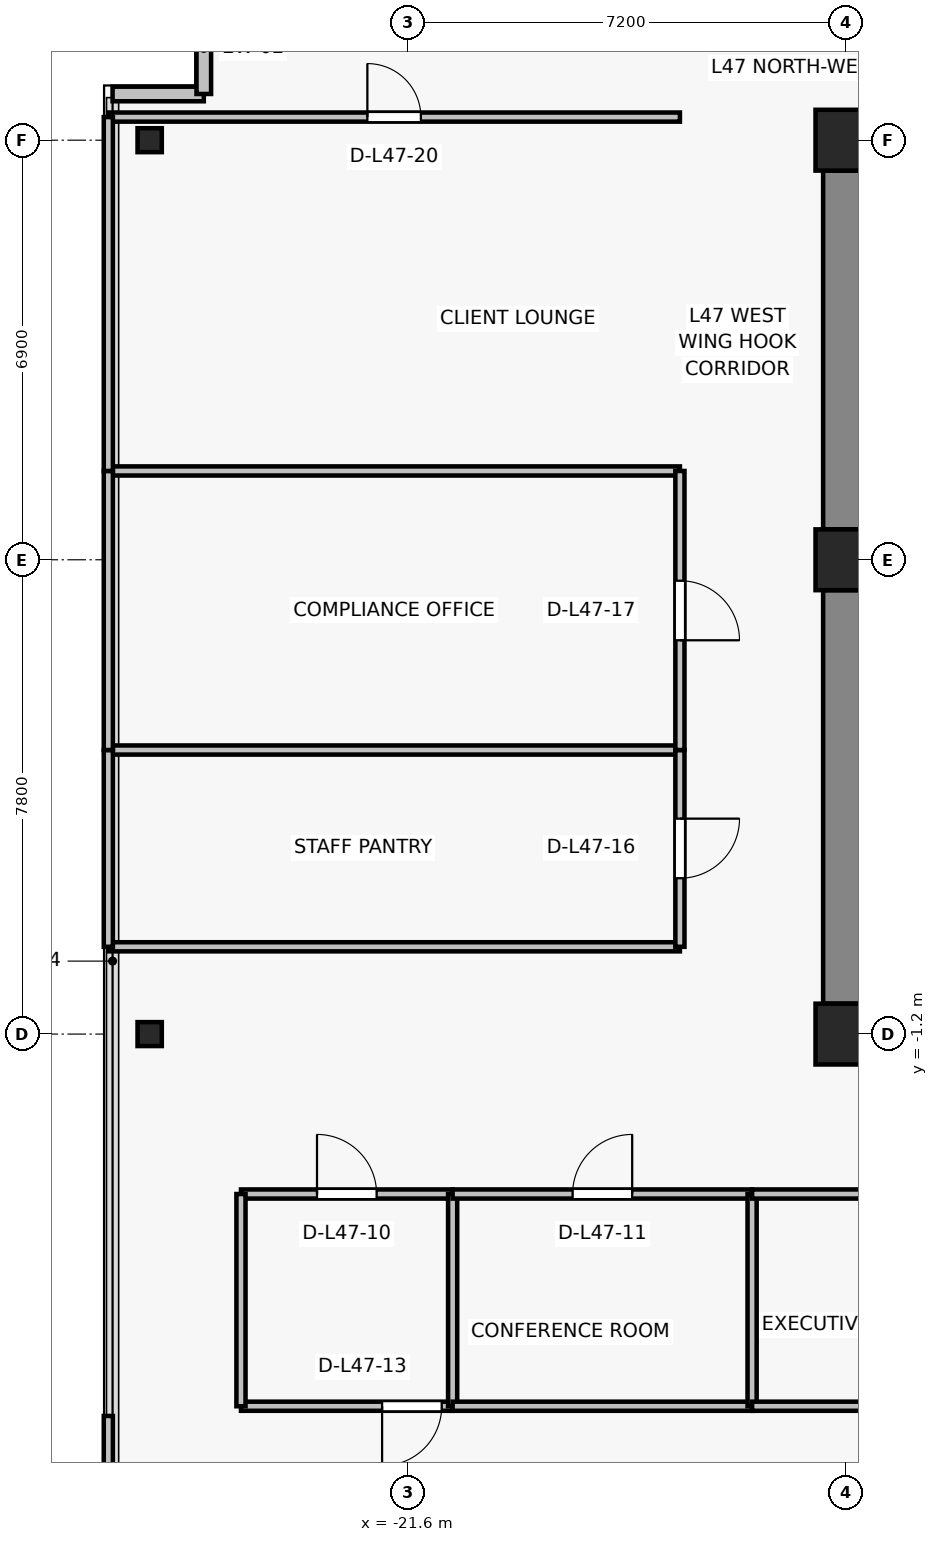
"""IFC4 building model, lengths in metres.
Left out: names, types, materials, properties, quantities, classifications, styles, units other than length and angle.
Written with IfcOpenShell. Run it as: python <this file> out.ifc"""

import sys

from ifc_helpers import new_model, si_unit, direction, frame, frame_2d, origin, origin_2d, place, context, subcontext, project, spatial, rectangle, i_section, extrude, source, transform, mapped, element, fill, save


model = new_model("IFC4")
c1 = context("Model", 3, precision=1e-05, world=origin(), true_north=direction((0.0, 1.0)))
c2 = subcontext(c1, "Body", "Model", "MODEL_VIEW")
j1 = project(units=[si_unit("LENGTHUNIT", "METRE"), si_unit("PLANEANGLEUNIT", "RADIAN")], contexts=[c1])
p1 = place(None, origin())
s1 = spatial("IfcSite", under=j1, at=p1, CompositionType="ELEMENT")
p2 = place(p1, origin())
s2 = spatial("IfcBuilding", under=s1, at=p2, CompositionType="ELEMENT")
p3 = place(p2, frame((0.0, 0.0, 169.3)))
s3 = spatial("IfcBuildingStorey", under=s2, at=p3, CompositionType="ELEMENT", Elevation=169.3)
for number, where, z_axis, x_axis in (
    (1, (-14.4, -1.2, 0.0), (0.0, 0.0, 1.0), (1.0, 0.0, 0.0)),
    (2, (-14.4, 6.6, 0.0), (0.0, 0.0, 1.0), (1.0, 0.0, 0.0)),
    (3, (-14.4, 13.5, 0.0), (0.0, 0.0, 1.0), (1.0, 0.0, 0.0)),
):
    element("IfcColumn", number, at=place(p3, frame(where, z_axis=z_axis, x_axis=x_axis)), inside=s3, PredefinedType="COLUMN", context=c2, shape_type="SweptSolid", body=[
        extrude(rectangle(XDim=1.0, YDim=1.0, at=origin_2d()), origin(), (0.0, 0.0, 1.0), 3.3),
    ])
for number, where, z_axis, x_axis in (
    (4, (-25.85, -1.2, 0.0), (0.0, 0.0, 1.0), (1.0, 0.0, 0.0)),
    (5, (-25.85, 13.5, 0.0), (0.0, 0.0, 1.0), (1.0, 0.0, 0.0)),
):
    element("IfcColumn", number, at=place(p3, frame(where, z_axis=z_axis, x_axis=x_axis)), inside=s3, PredefinedType="COLUMN", context=c2, shape_type="SweptSolid", body=[
        extrude(i_section(OverallWidth=0.399, OverallDepth=0.394, WebThickness=0.023, FlangeThickness=0.037, FilletRadius=0.015, at=origin_2d()), origin(), (0.0, 0.0, 1.0), 3.3),
    ])
p4 = place(p3, frame((-14.4, -0.7, 0.0), z_axis=(0.0, 0.0, 1.0), x_axis=(0.0, 1.0, 0.0)))
e6 = element("IfcWall", 6, at=p4, inside=s3, PredefinedType="SHEAR", context=c2, shape_type="SweptSolid", body=[
    extrude(rectangle(XDim=6.8, YDim=0.75, at=frame_2d((3.4, 0.0))), origin(), (0.0, 0.0, 1.0), 3.075),
])
p5 = place(p3, frame((-14.4, 7.1, 0.0), z_axis=(0.0, 0.0, 1.0), x_axis=(0.0, 1.0, 0.0)))
e7 = element("IfcWall", 7, at=p5, inside=s3, PredefinedType="SHEAR", context=c2, shape_type="SweptSolid", body=[
    extrude(rectangle(XDim=5.9, YDim=0.75, at=frame_2d((2.95, 0.0))), origin(), (0.0, 0.0, 1.0), 3.075),
])
for number, where, z_axis, x_axis in (
    (8, (-24.96, 14.26, 0.0), (0.0, 0.0, 1.0), (-1.0, 0.0, 0.0)),
    (9, (-24.96, 15.76, 0.0), (0.0, 0.0, 1.0), (0.0, -1.0, 0.0)),
):
    element("IfcWall", number, at=place(p3, frame(where, z_axis=z_axis, x_axis=x_axis)), inside=s3, PredefinedType="SOLIDWALL", context=c2, shape_type="SweptSolid", body=[
        extrude(rectangle(XDim=1.5, YDim=0.24, at=frame_2d((0.75, 0.0))), origin(), (0.0, 0.0, 1.0), 3.075),
    ])
p6 = place(p3, frame((-20.868, -7.32, 0.0), z_axis=(0.0, 0.0, 1.0), x_axis=(-1.0, 0.0, 0.0)))
e10 = element("IfcWall", 10, at=p6, inside=s3, PredefinedType="PARTITIONING", context=c2, shape_type="SweptSolid", body=[
    extrude(rectangle(XDim=3.481, YDim=0.15, at=frame_2d((1.74, 0.0))), origin(), (0.0, 0.0, 1.0), 2.565),
])
p7 = place(p6, frame((0.18, 0.0, 0.0)))
e11 = element("IfcOpeningElement", 11, at=p7, cuts=e10, PredefinedType="OPENING", context=c2, shape_type="SweptSolid", body=[
    extrude(rectangle(XDim=0.98, YDim=2.15, at=frame_2d((0.49, 1.075))), frame((0.0, 0.085, 0.0), z_axis=(0.0, -1.0, 0.0), x_axis=(1.0, 0.0, 0.0)), (0.0, 0.0, 1.0), 0.17),
])
p8 = place(p3, frame((-24.349, -3.83, 0.0), z_axis=(0.0, 0.0, 1.0), x_axis=(1.0, 0.0, 0.0)))
e12 = element("IfcWall", 12, at=p8, inside=s3, PredefinedType="PARTITIONING", context=c2, shape_type="SweptSolid", body=[
    extrude(rectangle(XDim=3.481, YDim=0.15, at=frame_2d((1.74, 0.0))), origin(), (0.0, 0.0, 1.0), 2.565),
])
p9 = place(p8, frame((1.25, 0.0, 0.0)))
e13 = element("IfcOpeningElement", 13, at=p9, cuts=e12, PredefinedType="OPENING", context=c2, shape_type="SweptSolid", body=[
    extrude(rectangle(XDim=0.98, YDim=2.15, at=frame_2d((0.49, 1.075))), frame((0.0, 0.085, 0.0), z_axis=(0.0, -1.0, 0.0), x_axis=(1.0, 0.0, 0.0)), (0.0, 0.0, 1.0), 0.17),
])
p10 = place(p3, frame((-24.349, -7.32, 0.0), z_axis=(0.0, 0.0, 1.0), x_axis=(0.0, 1.0, 0.0)))
e14 = element("IfcWall", 14, at=p10, inside=s3, PredefinedType="PARTITIONING", context=c2, shape_type="SweptSolid", body=[
    extrude(rectangle(XDim=3.49, YDim=0.15, at=frame_2d((1.745, 0.0))), origin(), (0.0, 0.0, 1.0), 3.075),
])
p11 = place(p3, frame((-20.868, -3.83, 0.0), z_axis=(0.0, 0.0, 1.0), x_axis=(0.0, -1.0, 0.0)))
e15 = element("IfcWall", 15, at=p11, inside=s3, PredefinedType="PARTITIONING", context=c2, shape_type="SweptSolid", body=[
    extrude(rectangle(XDim=3.49, YDim=0.15, at=frame_2d((1.745, 0.0))), origin(), (0.0, 0.0, 1.0), 2.665),
])
p12 = place(p3, frame((-15.943, -7.32, 0.0), z_axis=(0.0, 0.0, 1.0), x_axis=(-1.0, 0.0, 0.0)))
e16 = element("IfcWall", 16, at=p12, inside=s3, PredefinedType="PARTITIONING", context=c2, shape_type="SweptSolid", body=[
    extrude(rectangle(XDim=4.925, YDim=0.15, at=frame_2d((2.462, 0.0))), origin(), (0.0, 0.0, 1.0), 3.075),
])
p13 = place(p3, frame((-20.868, -3.83, 0.0), z_axis=(0.0, 0.0, 1.0), x_axis=(1.0, 0.0, 0.0)))
e17 = element("IfcWall", 17, at=p13, inside=s3, PredefinedType="PARTITIONING", context=c2, shape_type="SweptSolid", body=[
    extrude(rectangle(XDim=4.925, YDim=0.15, at=frame_2d((2.462, 0.0))), origin(), (0.0, 0.0, 1.0), 3.075),
])
p14 = place(p13, frame((1.973, 0.0, 0.0)))
e18 = element("IfcOpeningElement", 18, at=p14, cuts=e17, PredefinedType="OPENING", context=c2, shape_type="SweptSolid", body=[
    extrude(rectangle(XDim=0.98, YDim=2.15, at=frame_2d((0.49, 1.075))), frame((0.0, 0.085, 0.0), z_axis=(0.0, -1.0, 0.0), x_axis=(1.0, 0.0, 0.0)), (0.0, 0.0, 1.0), 0.17),
])
p15 = place(p3, frame((-15.943, -3.83, 0.0), z_axis=(0.0, 0.0, 1.0), x_axis=(0.0, -1.0, 0.0)))
e19 = element("IfcWall", 19, at=p15, inside=s3, PredefinedType="PARTITIONING", context=c2, shape_type="SweptSolid", body=[
    extrude(rectangle(XDim=3.49, YDim=0.15, at=frame_2d((1.745, 0.0))), origin(), (0.0, 0.0, 1.0), 2.665),
])
p16 = place(p3, frame((-9.43, -7.32, 0.0), z_axis=(0.0, 0.0, 1.0), x_axis=(-1.0, 0.0, 0.0)))
e20 = element("IfcWall", 20, at=p16, inside=s3, PredefinedType="PARTITIONING", context=c2, shape_type="SweptSolid", body=[
    extrude(rectangle(XDim=6.513, YDim=0.15, at=frame_2d((3.257, 0.0))), origin(), (0.0, 0.0, 1.0), 2.565),
])
p17 = place(p3, frame((-15.943, -3.83, 0.0), z_axis=(0.0, 0.0, 1.0), x_axis=(1.0, 0.0, 0.0)))
e21 = element("IfcWall", 21, at=p17, inside=s3, PredefinedType="PARTITIONING", context=c2, shape_type="SweptSolid", body=[
    extrude(rectangle(XDim=6.513, YDim=0.15, at=frame_2d((3.257, 0.0))), origin(), (0.0, 0.0, 1.0), 2.565),
])
p18 = place(p17, frame((2.767, 0.0, 0.0)))
e22 = element("IfcOpeningElement", 22, at=p18, cuts=e21, PredefinedType="OPENING", context=c2, shape_type="SweptSolid", body=[
    extrude(rectangle(XDim=0.98, YDim=2.15, at=frame_2d((0.49, 1.075))), frame((0.0, 0.085, 0.0), z_axis=(0.0, -1.0, 0.0), x_axis=(1.0, 0.0, 0.0)), (0.0, 0.0, 1.0), 0.17),
])
p19 = place(p3, frame((-26.53, -17.33, 0.0), z_axis=(0.0, 0.0, 1.0), x_axis=(0.0, 1.0, 0.0)))
e23 = element("IfcWall", 23, at=p19, inside=s3, PredefinedType="PARTITIONING", context=c2, shape_type="SweptSolid", body=[
    extrude(rectangle(XDim=9.85, YDim=0.15, at=frame_2d((4.925, 0.0))), origin(), (0.0, 0.0, 1.0), 3.075),
])
for number, where, z_axis, x_axis in (
    (24, (-17.13, 0.236, 0.0), (0.0, 0.0, 1.0), (-1.0, 0.0, 0.0)),
    (25, (-26.53, 3.471, 0.0), (0.0, 0.0, 1.0), (1.0, 0.0, 0.0)),
):
    element("IfcWall", number, at=place(p3, frame(where, z_axis=z_axis, x_axis=x_axis)), inside=s3, PredefinedType="PARTITIONING", context=c2, shape_type="SweptSolid", body=[
        extrude(rectangle(XDim=9.4, YDim=0.15, at=frame_2d((4.7, 0.0))), origin(), (0.0, 0.0, 1.0), 2.565),
    ])
p20 = place(p3, frame((-26.53, 0.236, 0.0), z_axis=(0.0, 0.0, 1.0), x_axis=(0.0, 1.0, 0.0)))
e26 = element("IfcWall", 26, at=p20, inside=s3, PredefinedType="PARTITIONING", context=c2, shape_type="SweptSolid", body=[
    extrude(rectangle(XDim=3.236, YDim=0.15, at=frame_2d((1.618, 0.0))), origin(), (0.0, 0.0, 1.0), 3.075),
])
p21 = place(p3, frame((-17.13, 3.471, 0.0), z_axis=(0.0, 0.0, 1.0), x_axis=(0.0, -1.0, 0.0)))
e27 = element("IfcWall", 27, at=p21, inside=s3, PredefinedType="PARTITIONING", context=c2, shape_type="SweptSolid", body=[
    extrude(rectangle(XDim=3.236, YDim=0.15, at=frame_2d((1.618, 0.0))), origin(), (0.0, 0.0, 1.0), 3.075),
])
p22 = place(p21, frame((1.128, 0.0, 0.0)))
e28 = element("IfcOpeningElement", 28, at=p22, cuts=e27, PredefinedType="OPENING", context=c2, shape_type="SweptSolid", body=[
    extrude(rectangle(XDim=0.98, YDim=2.15, at=frame_2d((0.49, 1.075))), frame((0.0, 0.085, 0.0), z_axis=(0.0, -1.0, 0.0), x_axis=(1.0, 0.0, 0.0)), (0.0, 0.0, 1.0), 0.17),
])
p23 = place(p3, frame((-26.53, 8.061, 0.0), z_axis=(0.0, 0.0, 1.0), x_axis=(1.0, 0.0, 0.0)))
e29 = element("IfcWall", 29, at=p23, inside=s3, PredefinedType="PARTITIONING", context=c2, shape_type="SweptSolid", body=[
    extrude(rectangle(XDim=9.4, YDim=0.15, at=frame_2d((4.7, 0.0))), origin(), (0.0, 0.0, 1.0), 2.565),
])
p24 = place(p3, frame((-26.53, 3.471, 0.0), z_axis=(0.0, 0.0, 1.0), x_axis=(0.0, 1.0, 0.0)))
e30 = element("IfcWall", 30, at=p24, inside=s3, PredefinedType="PARTITIONING", context=c2, shape_type="SweptSolid", body=[
    extrude(rectangle(XDim=4.589, YDim=0.15, at=frame_2d((2.295, 0.0))), origin(), (0.0, 0.0, 1.0), 3.075),
])
p25 = place(p3, frame((-17.13, 8.061, 0.0), z_axis=(0.0, 0.0, 1.0), x_axis=(0.0, -1.0, 0.0)))
e31 = element("IfcWall", 31, at=p25, inside=s3, PredefinedType="PARTITIONING", context=c2, shape_type="SweptSolid", body=[
    extrude(rectangle(XDim=4.589, YDim=0.15, at=frame_2d((2.295, 0.0))), origin(), (0.0, 0.0, 1.0), 3.075),
])
p26 = place(p25, frame((1.804, 0.0, 0.0)))
e32 = element("IfcOpeningElement", 32, at=p26, cuts=e31, PredefinedType="OPENING", context=c2, shape_type="SweptSolid", body=[
    extrude(rectangle(XDim=0.98, YDim=2.15, at=frame_2d((0.49, 1.075))), frame((0.0, 0.085, 0.0), z_axis=(0.0, -1.0, 0.0), x_axis=(1.0, 0.0, 0.0)), (0.0, 0.0, 1.0), 0.17),
])
p27 = place(p3, frame((-26.53, 13.88, 0.0), z_axis=(0.0, 0.0, 1.0), x_axis=(1.0, 0.0, 0.0)))
e33 = element("IfcWall", 33, at=p27, inside=s3, PredefinedType="PARTITIONING", context=c2, shape_type="SweptSolid", body=[
    extrude(rectangle(XDim=9.4, YDim=0.15, at=frame_2d((4.7, 0.0))), origin(), (0.0, 0.0, 1.0), 3.075),
])
p28 = place(p27, frame((4.26, 0.0, 0.0)))
e34 = element("IfcOpeningElement", 34, at=p28, cuts=e33, PredefinedType="OPENING", context=c2, shape_type="SweptSolid", body=[
    extrude(rectangle(XDim=0.88, YDim=2.1, at=frame_2d((0.44, 1.05))), frame((0.0, 0.085, 0.0), z_axis=(0.0, -1.0, 0.0), x_axis=(1.0, 0.0, 0.0)), (0.0, 0.0, 1.0), 0.17),
])
p29 = place(p3, frame((-26.53, 8.061, 0.0), z_axis=(0.0, 0.0, 1.0), x_axis=(0.0, 1.0, 0.0)))
e35 = element("IfcWall", 35, at=p29, inside=s3, PredefinedType="PARTITIONING", context=c2, shape_type="SweptSolid", body=[
    extrude(rectangle(XDim=5.819, YDim=0.15, at=frame_2d((2.91, 0.0))), origin(), (0.0, 0.0, 1.0), 3.075),
])
m1 = source(origin(), c2, "Body", "SweptSolid", [
    extrude(rectangle(XDim=0.98, YDim=2.15, at=frame_2d((0.49, 1.075))), frame((0.0, 0.025, 0.0), z_axis=(0.0, -1.0, 0.0), x_axis=(1.0, 0.0, 0.0)), (0.0, 0.0, 1.0), 0.05),
])
p30 = place(p9, origin())
e36 = element("IfcDoor", 36, at=p30, inside=s3, OperationType="SINGLE_SWING_LEFT", PredefinedType="DOOR", context=c2, shape_type="MappedRepresentation", body=[
    mapped(m1, transform((0.0, 0.0, 0.0), x_axis=(1.0, 0.0, 0.0), y_axis=(0.0, 1.0, 0.0), z_axis=(0.0, 0.0, 1.0), scale=1.0)),
])
fill(e13, e36)
p31 = place(p14, origin())
e37 = element("IfcDoor", 37, at=p31, inside=s3, OperationType="SINGLE_SWING_RIGHT", PredefinedType="DOOR", context=c2, shape_type="MappedRepresentation", body=[
    mapped(m1, transform((0.0, 0.0, 0.0), x_axis=(1.0, 0.0, 0.0), y_axis=(0.0, 1.0, 0.0), z_axis=(0.0, 0.0, 1.0), scale=1.0)),
])
fill(e18, e37)
p32 = place(p7, origin())
e38 = element("IfcDoor", 38, at=p32, inside=s3, OperationType="SINGLE_SWING_RIGHT", PredefinedType="DOOR", context=c2, shape_type="MappedRepresentation", body=[
    mapped(m1, transform((0.0, 0.0, 0.0), x_axis=(1.0, 0.0, 0.0), y_axis=(0.0, 1.0, 0.0), z_axis=(0.0, 0.0, 1.0), scale=1.0)),
])
fill(e11, e38)
p33 = place(p22, origin())
e39 = element("IfcDoor", 39, at=p33, inside=s3, OperationType="SINGLE_SWING_LEFT", PredefinedType="DOOR", context=c2, shape_type="MappedRepresentation", body=[
    mapped(m1, transform((0.0, 0.0, 0.0), x_axis=(1.0, 0.0, 0.0), y_axis=(0.0, 1.0, 0.0), z_axis=(0.0, 0.0, 1.0), scale=1.0)),
])
fill(e28, e39)
p34 = place(p26, origin())
e40 = element("IfcDoor", 40, at=p34, inside=s3, OperationType="SINGLE_SWING_RIGHT", PredefinedType="DOOR", context=c2, shape_type="MappedRepresentation", body=[
    mapped(m1, transform((0.0, 0.0, 0.0), x_axis=(1.0, 0.0, 0.0), y_axis=(0.0, 1.0, 0.0), z_axis=(0.0, 0.0, 1.0), scale=1.0)),
])
fill(e32, e40)
m2 = source(origin(), c2, "Body", "SweptSolid", [
    extrude(rectangle(XDim=0.88, YDim=2.1, at=frame_2d((0.44, 1.05))), frame((0.0, 0.025, 0.0), z_axis=(0.0, -1.0, 0.0), x_axis=(1.0, 0.0, 0.0)), (0.0, 0.0, 1.0), 0.05),
])
p35 = place(p28, origin())
e41 = element("IfcDoor", 41, at=p35, inside=s3, OperationType="SINGLE_SWING_LEFT", PredefinedType="DOOR", context=c2, shape_type="MappedRepresentation", body=[
    mapped(m2, transform((0.0, 0.0, 0.0), x_axis=(1.0, 0.0, 0.0), y_axis=(0.0, 1.0, 0.0), z_axis=(0.0, 0.0, 1.0), scale=1.0)),
])
fill(e34, e41)
save(model, sys.argv[1])
